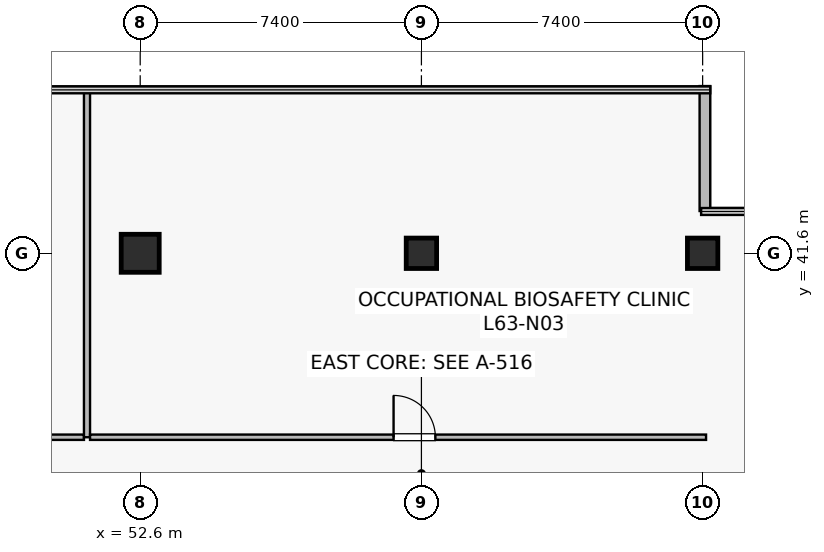
"""IFC4 building model, lengths in metres.
Left out: names, types, materials, properties, quantities, classifications, styles, units other than length and angle.
Written with IfcOpenShell. Run it as: python <this file> out.ifc"""

import sys

from ifc_helpers import new_model, si_unit, direction, frame, frame_2d, origin, origin_2d, place, context, subcontext, project, spatial, rectangle, extrude, source, transform, mapped, element, fill, save


model = new_model("IFC4")
c1 = context("Model", 3, precision=1e-05, world=origin(), true_north=direction((0.0, 1.0)))
c2 = subcontext(c1, "Body", "Model", "MODEL_VIEW")
j1 = project(units=[si_unit("LENGTHUNIT", "METRE"), si_unit("PLANEANGLEUNIT", "RADIAN")], contexts=[c1])
p1 = place(None, origin())
s1 = spatial("IfcSite", under=j1, at=p1, CompositionType="ELEMENT")
p2 = place(p1, origin())
s2 = spatial("IfcBuilding", under=s1, at=p2, CompositionType="ELEMENT")
p3 = place(p2, frame((0.0, 0.0, 262.9)))
s3 = spatial("IfcBuildingStorey", under=s2, at=p3, CompositionType="ELEMENT", Elevation=262.9)
m1 = source(origin(), c2, "Body", "SweptSolid", [
    extrude(rectangle(XDim=1.0, YDim=1.0, at=origin_2d()), origin(), (0.0, 0.0, 1.0), 4.1),
])
p4 = place(p3, frame((52.6, 41.6, 0.0), z_axis=(0.0, 0.0, 1.0), x_axis=(1.0, 0.0, 0.0)))
e1 = element("IfcColumn", 1, at=p4, inside=s3, PredefinedType="COLUMN", context=c2, shape_type="MappedRepresentation", body=[
    mapped(m1, transform((0.0, 0.0, 0.0), scale=1.0)),
])
m2 = source(origin(), c2, "Body", "SweptSolid", [
    extrude(rectangle(XDim=0.8, YDim=0.8, at=origin_2d()), origin(), (0.0, 0.0, 1.0), 4.1),
])
for number, where, z_axis, x_axis in (
    (2, (60.0, 41.6, 0.0), (0.0, 0.0, 1.0), (1.0, 0.0, 0.0)),
    (3, (67.4, 41.6, 0.0), (0.0, 0.0, 1.0), (1.0, 0.0, 0.0)),
):
    element("IfcColumn", number, at=place(p3, frame(where, z_axis=z_axis, x_axis=x_axis)), inside=s3, PredefinedType="COLUMN", context=c2, shape_type="MappedRepresentation", body=[
        mapped(m2, transform((0.0, 0.0, 0.0), scale=1.0)),
    ])
p5 = place(p3, frame((67.46, 42.712, 0.0), z_axis=(0.0, 0.0, 1.0), x_axis=(0.0, 1.0, 0.0)))
e4 = element("IfcWall", 4, at=p5, inside=s3, PredefinedType="STANDARD", context=c2, shape_type="SweptSolid", body=[
    extrude(rectangle(XDim=3.288, YDim=0.28, at=frame_2d((1.644, 0.0))), origin(), (0.0, 0.0, 1.0), 3.8),
])
p6 = place(p3, frame((26.88, 36.76, 0.0), z_axis=(0.0, 0.0, 1.0), x_axis=(1.0, 0.0, 0.0)))
e5 = element("IfcWall", 5, at=p6, inside=s3, PredefinedType="PARTITIONING", context=c2, shape_type="SweptSolid", body=[
    extrude(rectangle(XDim=24.24, YDim=0.14, at=frame_2d((12.12, 0.0))), origin(), (0.0, 0.0, 1.0), 3.197),
])
p7 = place(p6, frame((9.55, 0.0, 0.0)))
e6 = element("IfcOpeningElement", 6, at=p7, cuts=e5, PredefinedType="OPENING", context=c2, shape_type="SweptSolid", body=[
    extrude(rectangle(XDim=1.1, YDim=2.18, at=frame_2d((0.55, 1.09))), frame((0.0, 0.08, 0.0), z_axis=(0.0, -1.0, 0.0), x_axis=(1.0, 0.0, 0.0)), (0.0, 0.0, 1.0), 0.16),
])
p8 = place(p3, frame((51.2, 36.76, 0.0), z_axis=(0.0, 0.0, 1.0), x_axis=(0.0, 1.0, 0.0)))
e7 = element("IfcWall", 7, at=p8, inside=s3, PredefinedType="PARTITIONING", context=c2, shape_type="SweptSolid", body=[
    extrude(rectangle(XDim=9.13, YDim=0.16, at=frame_2d((4.565, 0.0))), origin(), (0.0, 0.0, 1.0), 3.135),
])
p9 = place(p3, frame((51.28, 36.76, 0.0), z_axis=(0.0, 0.0, 1.0), x_axis=(1.0, 0.0, 0.0)))
e8 = element("IfcWall", 8, at=p9, inside=s3, PredefinedType="PARTITIONING", context=c2, shape_type="SweptSolid", body=[
    extrude(rectangle(XDim=16.21, YDim=0.14, at=frame_2d((8.105, 0.0))), origin(), (0.0, 0.0, 1.0), 3.197),
])
p10 = place(p9, frame((7.987, 0.0, 0.0)))
e9 = element("IfcOpeningElement", 9, at=p10, cuts=e8, PredefinedType="OPENING", context=c2, shape_type="SweptSolid", body=[
    extrude(rectangle(XDim=1.1, YDim=2.18, at=frame_2d((0.55, 1.09))), frame((0.0, 0.08, 0.0), z_axis=(0.0, -1.0, 0.0), x_axis=(1.0, 0.0, 0.0)), (0.0, 0.0, 1.0), 0.16),
])
m3 = source(origin(), c2, "Body", "SweptSolid", [
    extrude(rectangle(XDim=1.1, YDim=2.18, at=frame_2d((0.55, 1.09))), frame((0.0, 0.025, 0.0), z_axis=(0.0, -1.0, 0.0), x_axis=(1.0, 0.0, 0.0)), (0.0, 0.0, 1.0), 0.05),
])
p11 = place(p10, origin())
e10 = element("IfcDoor", 10, at=p11, inside=s3, OperationType="SINGLE_SWING_LEFT", PredefinedType="DOOR", context=c2, shape_type="MappedRepresentation", body=[
    mapped(m3, transform((0.0, 0.0, 0.0), scale=1.0)),
])
fill(e9, e10)
save(model, sys.argv[1])
